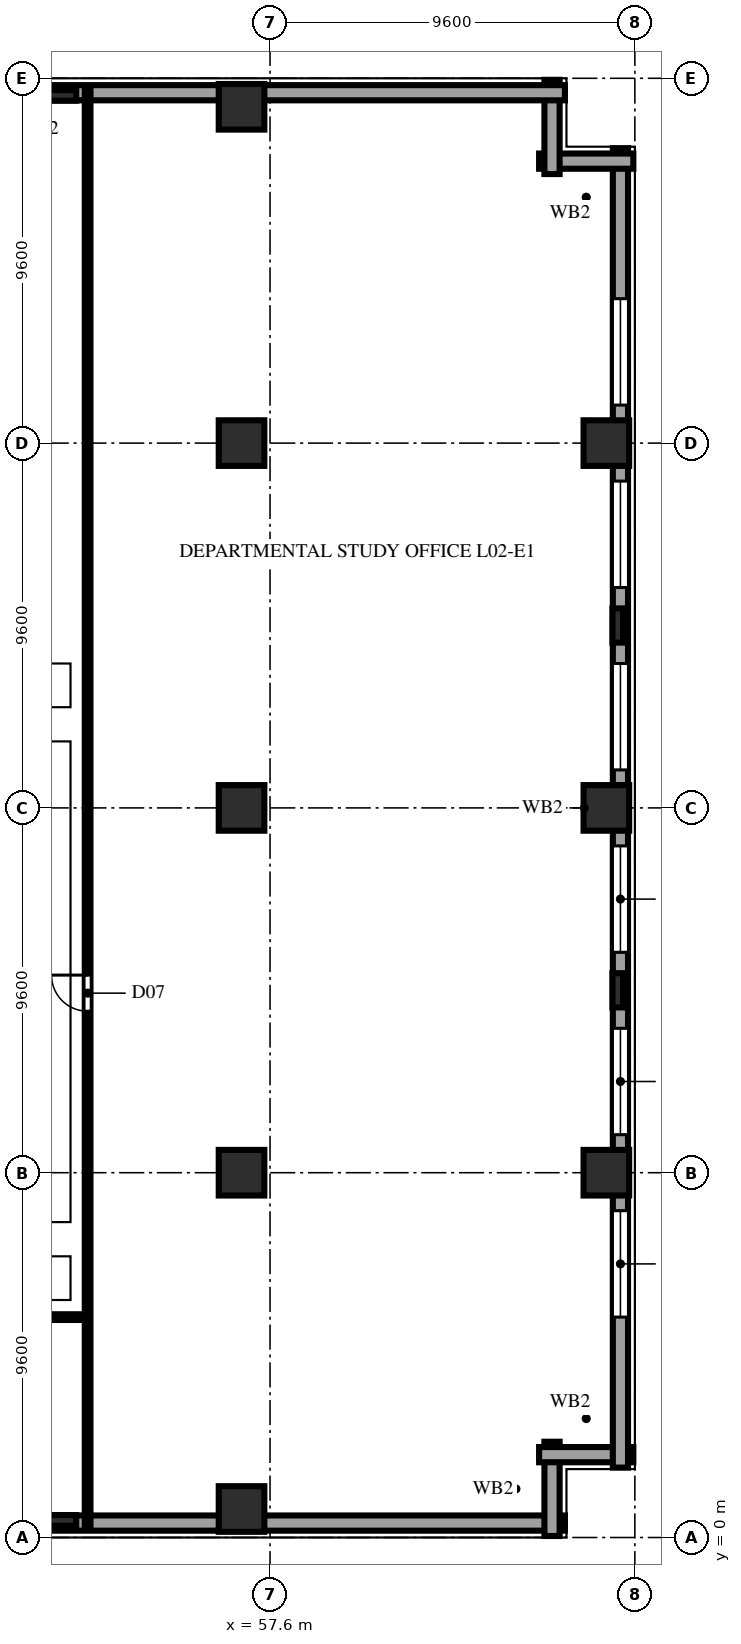
"""IFC4 building model, lengths in metres.
Left out: names, types, materials, properties, quantities, classifications, styles, units other than length and angle.
Written with IfcOpenShell. Run it as: python <this file> out.ifc"""

import sys

from ifc_helpers import new_model, si_unit, direction, frame, frame_2d, origin, origin_2d, place, context, subcontext, project, spatial, rectangle, extrude, element, fill, save


model = new_model("IFC4")
c1 = context("Model", 3, precision=1e-05, world=origin(), true_north=direction((0.0, 1.0)))
c2 = subcontext(c1, "Body", "Model", "MODEL_VIEW")
j1 = project(units=[si_unit("LENGTHUNIT", "METRE"), si_unit("PLANEANGLEUNIT", "RADIAN")], contexts=[c1])
p1 = place(None, origin())
s1 = spatial("IfcSite", under=j1, at=p1, CompositionType="ELEMENT")
p2 = place(p1, origin())
s2 = spatial("IfcBuilding", under=s1, at=p2, CompositionType="ELEMENT")
p3 = place(p2, frame((0.0, 0.0, 10.4)))
s3 = spatial("IfcBuildingStorey", under=s2, at=p3, CompositionType="ELEMENT", Elevation=10.4)
for number, where, z_axis, x_axis in (
    (1, (56.85, 0.75, 0.0), (0.0, 0.0, 1.0), (1.0, 0.0, 0.0)),
    (2, (56.85, 9.6, 0.0), (0.0, 0.0, 1.0), (1.0, 0.0, 0.0)),
    (3, (56.85, 19.2, 0.0), (0.0, 0.0, 1.0), (1.0, 0.0, 0.0)),
    (4, (56.85, 28.8, 0.0), (0.0, 0.0, 1.0), (1.0, 0.0, 0.0)),
    (5, (56.85, 37.65, 0.0), (0.0, 0.0, 1.0), (1.0, 0.0, 0.0)),
    (6, (66.45, 9.6, 0.0), (0.0, 0.0, 1.0), (1.0, 0.0, 0.0)),
    (7, (66.45, 19.2, 0.0), (0.0, 0.0, 1.0), (1.0, 0.0, 0.0)),
    (8, (66.45, 28.8, 0.0), (0.0, 0.0, 1.0), (1.0, 0.0, 0.0)),
):
    element("IfcColumn", number, at=place(p3, frame(where, z_axis=z_axis, x_axis=x_axis)), inside=s3, PredefinedType="COLUMN", context=c2, shape_type="SweptSolid", body=[
        extrude(rectangle(XDim=1.2, YDim=1.2, at=origin_2d()), origin(), (0.0, 0.0, 1.0), 4.6),
    ])
for number, where, z_axis, x_axis in (
    (9, (52.05, 0.45, 0.0), (0.0, 0.0, 1.0), (1.0, 0.0, 0.0)),
    (10, (66.75, 14.4, 0.0), (0.0, 0.0, 1.0), (0.0, 1.0, 0.0)),
    (11, (66.75, 24.0, 0.0), (0.0, 0.0, 1.0), (0.0, 1.0, 0.0)),
    (12, (52.05, 37.95, 0.0), (0.0, 0.0, 1.0), (1.0, 0.0, 0.0)),
):
    element("IfcColumn", number, at=place(p3, frame(where, z_axis=z_axis, x_axis=x_axis)), inside=s3, PredefinedType="PILASTER", context=c2, shape_type="SweptSolid", body=[
        extrude(rectangle(XDim=0.9, YDim=0.28, at=origin_2d()), origin(), (0.0, 0.0, 1.0), 4.6),
    ])
p4 = place(p3, frame((1.84, 0.38, 0.0), z_axis=(0.0, 0.0, 1.0), x_axis=(1.0, 0.0, 0.0)))
e13 = element("IfcWall", 13, at=p4, inside=s3, PredefinedType="SOLIDWALL", context=c2, shape_type="SweptSolid", body=[
    extrude(rectangle(XDim=63.52, YDim=0.4, at=frame_2d((31.76, 0.0))), origin(), (0.0, 0.0, 1.0), 4.26),
])
p5 = place(p4, frame((3.96, 0.0, 0.75)))
e14 = element("IfcOpeningElement", 14, at=p5, cuts=e13, PredefinedType="OPENING", context=c2, shape_type="SweptSolid", body=[
    extrude(rectangle(XDim=2.8, YDim=2.3, at=frame_2d((1.4, 1.15))), frame((0.0, 0.212, 0.0), z_axis=(0.0, -1.0, 0.0), x_axis=(1.0, 0.0, 0.0)), (0.0, 0.0, 1.0), 0.424),
])
p6 = place(p4, frame((13.56, 0.0, 0.75)))
e15 = element("IfcOpeningElement", 15, at=p6, cuts=e13, PredefinedType="OPENING", context=c2, shape_type="SweptSolid", body=[
    extrude(rectangle(XDim=2.8, YDim=2.3, at=frame_2d((1.4, 1.15))), frame((0.0, 0.212, 0.0), z_axis=(0.0, -1.0, 0.0), x_axis=(1.0, 0.0, 0.0)), (0.0, 0.0, 1.0), 0.424),
])
p7 = place(p4, frame((18.36, 0.0, 0.75)))
e16 = element("IfcOpeningElement", 16, at=p7, cuts=e13, PredefinedType="OPENING", context=c2, shape_type="SweptSolid", body=[
    extrude(rectangle(XDim=2.8, YDim=2.3, at=frame_2d((1.4, 1.15))), frame((0.0, 0.212, 0.0), z_axis=(0.0, -1.0, 0.0), x_axis=(1.0, 0.0, 0.0)), (0.0, 0.0, 1.0), 0.424),
])
p8 = place(p4, frame((27.96, 0.0, 0.75)))
e17 = element("IfcOpeningElement", 17, at=p8, cuts=e13, PredefinedType="OPENING", context=c2, shape_type="SweptSolid", body=[
    extrude(rectangle(XDim=2.8, YDim=2.3, at=frame_2d((1.4, 1.15))), frame((0.0, 0.212, 0.0), z_axis=(0.0, -1.0, 0.0), x_axis=(1.0, 0.0, 0.0)), (0.0, 0.0, 1.0), 0.424),
])
for number, where, z_axis, x_axis in (
    (18, (65.02, 0.04, 0.0), (0.0, 0.0, 1.0), (0.0, 1.0, 0.0)),
    (19, (64.68, 2.18, 0.0), (0.0, 0.0, 1.0), (1.0, 0.0, 0.0)),
):
    element("IfcWall", number, at=place(p3, frame(where, z_axis=z_axis, x_axis=x_axis)), inside=s3, PredefinedType="SOLIDWALL", context=c2, shape_type="SweptSolid", body=[
        extrude(rectangle(XDim=2.48, YDim=0.4, at=frame_2d((1.24, 0.0))), origin(), (0.0, 0.0, 1.0), 4.26),
    ])
p9 = place(p3, frame((66.82, 1.84, 0.0), z_axis=(0.0, 0.0, 1.0), x_axis=(0.0, 1.0, 0.0)))
e20 = element("IfcWall", 20, at=p9, inside=s3, PredefinedType="SOLIDWALL", context=c2, shape_type="SweptSolid", body=[
    extrude(rectangle(XDim=34.72, YDim=0.4, at=frame_2d((17.36, 0.0))), origin(), (0.0, 0.0, 1.0), 4.26),
])
p10 = place(p9, frame((3.96, 0.0, 0.75)))
e21 = element("IfcOpeningElement", 21, at=p10, cuts=e20, PredefinedType="OPENING", context=c2, shape_type="SweptSolid", body=[
    extrude(rectangle(XDim=2.8, YDim=2.3, at=frame_2d((1.4, 1.15))), frame((0.0, 0.212, 0.0), z_axis=(0.0, -1.0, 0.0), x_axis=(1.0, 0.0, 0.0)), (0.0, 0.0, 1.0), 0.424),
])
p11 = place(p9, frame((8.76, 0.0, 0.75)))
e22 = element("IfcOpeningElement", 22, at=p11, cuts=e20, PredefinedType="OPENING", context=c2, shape_type="SweptSolid", body=[
    extrude(rectangle(XDim=2.8, YDim=2.3, at=frame_2d((1.4, 1.15))), frame((0.0, 0.212, 0.0), z_axis=(0.0, -1.0, 0.0), x_axis=(1.0, 0.0, 0.0)), (0.0, 0.0, 1.0), 0.424),
])
p12 = place(p9, frame((13.56, 0.0, 0.75)))
e23 = element("IfcOpeningElement", 23, at=p12, cuts=e20, PredefinedType="OPENING", context=c2, shape_type="SweptSolid", body=[
    extrude(rectangle(XDim=2.8, YDim=2.3, at=frame_2d((1.4, 1.15))), frame((0.0, 0.212, 0.0), z_axis=(0.0, -1.0, 0.0), x_axis=(1.0, 0.0, 0.0)), (0.0, 0.0, 1.0), 0.424),
])
p13 = place(p9, frame((18.36, 0.0, 0.75)))
e24 = element("IfcOpeningElement", 24, at=p13, cuts=e20, PredefinedType="OPENING", context=c2, shape_type="SweptSolid", body=[
    extrude(rectangle(XDim=2.8, YDim=2.3, at=frame_2d((1.4, 1.15))), frame((0.0, 0.212, 0.0), z_axis=(0.0, -1.0, 0.0), x_axis=(1.0, 0.0, 0.0)), (0.0, 0.0, 1.0), 0.424),
])
p14 = place(p9, frame((23.16, 0.0, 0.75)))
e25 = element("IfcOpeningElement", 25, at=p14, cuts=e20, PredefinedType="OPENING", context=c2, shape_type="SweptSolid", body=[
    extrude(rectangle(XDim=2.8, YDim=2.3, at=frame_2d((1.4, 1.15))), frame((0.0, 0.212, 0.0), z_axis=(0.0, -1.0, 0.0), x_axis=(1.0, 0.0, 0.0)), (0.0, 0.0, 1.0), 0.424),
])
p15 = place(p9, frame((27.96, 0.0, 0.75)))
e26 = element("IfcOpeningElement", 26, at=p15, cuts=e20, PredefinedType="OPENING", context=c2, shape_type="SweptSolid", body=[
    extrude(rectangle(XDim=2.8, YDim=2.3, at=frame_2d((1.4, 1.15))), frame((0.0, 0.212, 0.0), z_axis=(0.0, -1.0, 0.0), x_axis=(1.0, 0.0, 0.0)), (0.0, 0.0, 1.0), 0.424),
])
p16 = place(p3, frame((67.16, 36.22, 0.0), z_axis=(0.0, 0.0, 1.0), x_axis=(-1.0, 0.0, 0.0)))
e27 = element("IfcWall", 27, at=p16, inside=s3, PredefinedType="SOLIDWALL", context=c2, shape_type="SweptSolid", body=[
    extrude(rectangle(XDim=2.48, YDim=0.4, at=frame_2d((1.24, 0.0))), origin(), (0.0, 0.0, 1.0), 4.26),
])
p17 = place(p3, frame((65.02, 35.88, 0.0), z_axis=(0.0, 0.0, 1.0), x_axis=(0.0, 1.0, 0.0)))
e28 = element("IfcWall", 28, at=p17, inside=s3, PredefinedType="SOLIDWALL", context=c2, shape_type="SweptSolid", body=[
    extrude(rectangle(XDim=2.48, YDim=0.4, at=frame_2d((1.24, 0.0))), origin(), (0.0, 0.0, 1.0), 4.26),
])
p18 = place(p3, frame((65.36, 38.02, 0.0), z_axis=(0.0, 0.0, 1.0), x_axis=(-1.0, 0.0, 0.0)))
e29 = element("IfcWall", 29, at=p18, inside=s3, PredefinedType="SOLIDWALL", context=c2, shape_type="SweptSolid", body=[
    extrude(rectangle(XDim=27.68, YDim=0.4, at=frame_2d((13.84, 0.0))), origin(), (0.0, 0.0, 1.0), 4.26),
])
p19 = place(p3, frame((0.22, 5.8, 0.0), z_axis=(0.0, 0.0, 1.0), x_axis=(1.0, 0.0, 0.0)))
e30 = element("IfcWall", 30, at=p19, inside=s3, PredefinedType="PARTITIONING", context=c2, shape_type="SweptSolid", body=[
    extrude(rectangle(XDim=52.58, YDim=0.15, at=frame_2d((26.29, 0.0))), origin(), (0.0, 0.0, 1.0), 4.26),
])
p20 = place(p19, frame((10.18, 0.0, 0.0)))
e31 = element("IfcOpeningElement", 31, at=p20, cuts=e30, PredefinedType="OPENING", context=c2, shape_type="SweptSolid", body=[
    extrude(rectangle(XDim=0.95, YDim=2.15, at=frame_2d((0.475, 1.075))), frame((0.0, 0.087, 0.0), z_axis=(0.0, -1.0, 0.0), x_axis=(1.0, 0.0, 0.0)), (0.0, 0.0, 1.0), 0.174),
])
p21 = place(p19, frame((13.58, 0.0, 0.0)))
e32 = element("IfcOpeningElement", 32, at=p21, cuts=e30, PredefinedType="OPENING", context=c2, shape_type="SweptSolid", body=[
    extrude(rectangle(XDim=0.95, YDim=2.15, at=frame_2d((0.475, 1.075))), frame((0.0, 0.087, 0.0), z_axis=(0.0, -1.0, 0.0), x_axis=(1.0, 0.0, 0.0)), (0.0, 0.0, 1.0), 0.174),
])
p22 = place(p19, frame((32.53, 0.0, 0.0)))
e33 = element("IfcOpeningElement", 33, at=p22, cuts=e30, PredefinedType="OPENING", context=c2, shape_type="SweptSolid", body=[
    extrude(rectangle(XDim=0.95, YDim=2.15, at=frame_2d((0.475, 1.075))), frame((0.0, 0.087, 0.0), z_axis=(0.0, -1.0, 0.0), x_axis=(1.0, 0.0, 0.0)), (0.0, 0.0, 1.0), 0.174),
])
p23 = place(p19, frame((41.63, 0.0, 0.0)))
e34 = element("IfcOpeningElement", 34, at=p23, cuts=e30, PredefinedType="OPENING", context=c2, shape_type="SweptSolid", body=[
    extrude(rectangle(XDim=0.95, YDim=2.15, at=frame_2d((0.475, 1.075))), frame((0.0, 0.087, 0.0), z_axis=(0.0, -1.0, 0.0), x_axis=(1.0, 0.0, 0.0)), (0.0, 0.0, 1.0), 0.174),
])
p24 = place(p3, frame((52.8, 0.22, 0.0), z_axis=(0.0, 0.0, 1.0), x_axis=(0.0, 1.0, 0.0)))
e35 = element("IfcWall", 35, at=p24, inside=s3, PredefinedType="PARTITIONING", context=c2, shape_type="SweptSolid", body=[
    extrude(rectangle(XDim=37.96, YDim=0.15, at=frame_2d((18.98, 0.0))), origin(), (0.0, 0.0, 1.0), 4.26),
])
p25 = place(p24, frame((13.63, 0.0, 0.0)))
e36 = element("IfcOpeningElement", 36, at=p25, cuts=e35, PredefinedType="OPENING", context=c2, shape_type="SweptSolid", body=[
    extrude(rectangle(XDim=0.95, YDim=2.15, at=frame_2d((0.475, 1.075))), frame((0.0, 0.087, 0.0), z_axis=(0.0, -1.0, 0.0), x_axis=(1.0, 0.0, 0.0)), (0.0, 0.0, 1.0), 0.174),
])
p26 = place(p10, origin())
e37 = element("IfcWindow", 37, at=p26, inside=s3, PartitioningType="TRIPLE_PANEL_VERTICAL", PredefinedType="WINDOW", context=c2, shape_type="SweptSolid", body=[
    extrude(rectangle(XDim=2.8, YDim=2.3, at=frame_2d((1.4, 1.15))), frame((0.0, 0.11, 0.0), z_axis=(0.0, -1.0, 0.0), x_axis=(1.0, 0.0, 0.0)), (0.0, 0.0, 1.0), 0.06),
])
fill(e21, e37)
p27 = place(p11, origin())
e38 = element("IfcWindow", 38, at=p27, inside=s3, PartitioningType="TRIPLE_PANEL_VERTICAL", PredefinedType="WINDOW", context=c2, shape_type="SweptSolid", body=[
    extrude(rectangle(XDim=2.8, YDim=2.3, at=frame_2d((1.4, 1.15))), frame((0.0, 0.11, 0.0), z_axis=(0.0, -1.0, 0.0), x_axis=(1.0, 0.0, 0.0)), (0.0, 0.0, 1.0), 0.06),
])
fill(e22, e38)
p28 = place(p12, origin())
e39 = element("IfcWindow", 39, at=p28, inside=s3, PartitioningType="TRIPLE_PANEL_VERTICAL", PredefinedType="WINDOW", context=c2, shape_type="SweptSolid", body=[
    extrude(rectangle(XDim=2.8, YDim=2.3, at=frame_2d((1.4, 1.15))), frame((0.0, 0.11, 0.0), z_axis=(0.0, -1.0, 0.0), x_axis=(1.0, 0.0, 0.0)), (0.0, 0.0, 1.0), 0.06),
])
fill(e23, e39)
p29 = place(p13, origin())
e40 = element("IfcWindow", 40, at=p29, inside=s3, PartitioningType="TRIPLE_PANEL_VERTICAL", PredefinedType="WINDOW", context=c2, shape_type="SweptSolid", body=[
    extrude(rectangle(XDim=2.8, YDim=2.3, at=frame_2d((1.4, 1.15))), frame((0.0, 0.11, 0.0), z_axis=(0.0, -1.0, 0.0), x_axis=(1.0, 0.0, 0.0)), (0.0, 0.0, 1.0), 0.06),
])
fill(e24, e40)
p30 = place(p14, origin())
e41 = element("IfcWindow", 41, at=p30, inside=s3, PartitioningType="TRIPLE_PANEL_VERTICAL", PredefinedType="WINDOW", context=c2, shape_type="SweptSolid", body=[
    extrude(rectangle(XDim=2.8, YDim=2.3, at=frame_2d((1.4, 1.15))), frame((0.0, 0.11, 0.0), z_axis=(0.0, -1.0, 0.0), x_axis=(1.0, 0.0, 0.0)), (0.0, 0.0, 1.0), 0.06),
])
fill(e25, e41)
p31 = place(p15, origin())
e42 = element("IfcWindow", 42, at=p31, inside=s3, PartitioningType="TRIPLE_PANEL_VERTICAL", PredefinedType="WINDOW", context=c2, shape_type="SweptSolid", body=[
    extrude(rectangle(XDim=2.8, YDim=2.3, at=frame_2d((1.4, 1.15))), frame((0.0, 0.11, 0.0), z_axis=(0.0, -1.0, 0.0), x_axis=(1.0, 0.0, 0.0)), (0.0, 0.0, 1.0), 0.06),
])
fill(e26, e42)
p32 = place(p25, origin())
e43 = element("IfcDoor", 43, at=p32, inside=s3, OperationType="SINGLE_SWING_RIGHT", PredefinedType="DOOR", context=c2, shape_type="SweptSolid", body=[
    extrude(rectangle(XDim=0.95, YDim=2.15, at=frame_2d((0.475, 1.075))), frame((0.0, 0.025, 0.0), z_axis=(0.0, -1.0, 0.0), x_axis=(1.0, 0.0, 0.0)), (0.0, 0.0, 1.0), 0.05),
])
fill(e36, e43)
save(model, sys.argv[1])
